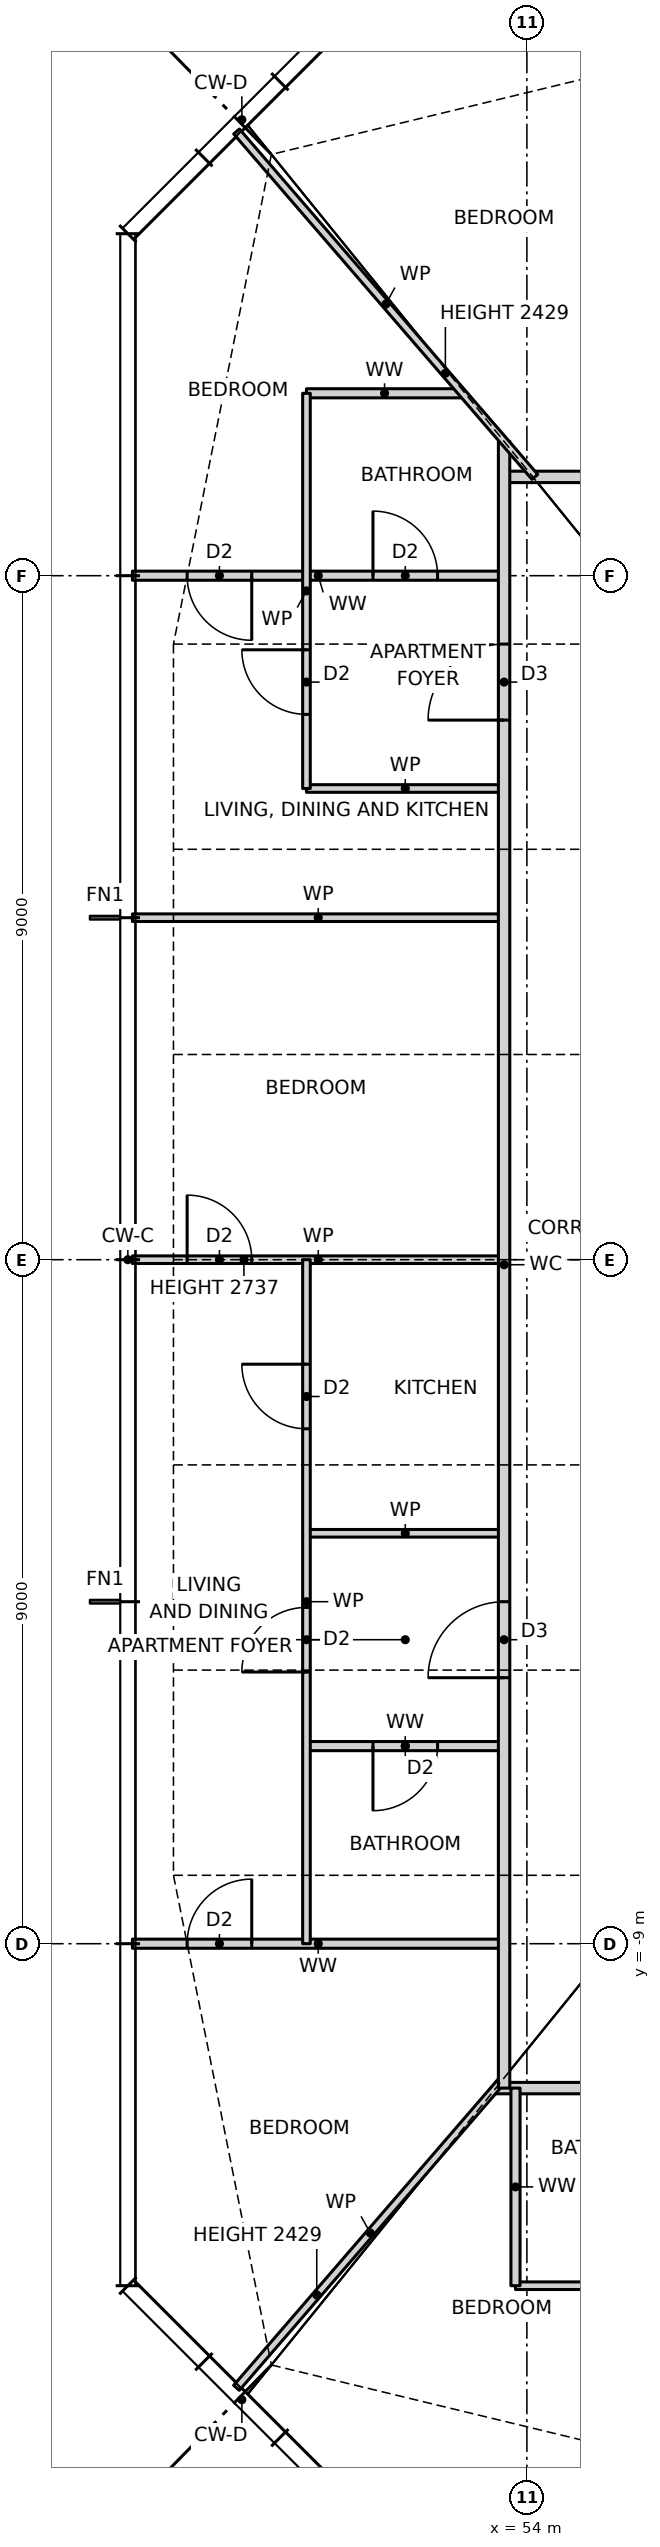
"""IFC4 building model, lengths in metres.
Left out: names, types, materials, properties, quantities, classifications, styles, units other than length and angle.
Written with IfcOpenShell. Run it as: python <this file> out.ifc"""

import sys

from ifc_helpers import new_model, si_unit, direction, frame, frame_2d, origin, place, context, subcontext, project, spatial, rectangle, extrude, element, fill, save


model = new_model("IFC4")
c1 = context("Model", 3, precision=1e-05, world=origin(), true_north=direction((0.0, 1.0)))
c2 = subcontext(c1, "Body", "Model", "MODEL_VIEW")
j1 = project(units=[si_unit("LENGTHUNIT", "METRE"), si_unit("PLANEANGLEUNIT", "RADIAN")], contexts=[c1])
p1 = place(None, origin())
s1 = spatial("IfcSite", under=j1, at=p1, CompositionType="ELEMENT")
p2 = place(p1, origin())
s2 = spatial("IfcBuilding", under=s1, at=p2, CompositionType="ELEMENT")
p3 = place(p2, frame((0.0, 0.0, 80.5)))
s3 = spatial("IfcBuildingStorey", under=s2, at=p3, CompositionType="ELEMENT", Elevation=80.5)
p4 = place(p3, frame((53.85, -13.5, 0.0), z_axis=(0.0, 0.0, 1.0), x_axis=(1.0, 0.0, 0.0)))
e1 = element("IfcWall", 1, at=p4, inside=s3, PredefinedType="PARTITIONING", context=c2, shape_type="SweptSolid", body=[
    extrude(rectangle(XDim=5.2, YDim=0.1, at=frame_2d((2.6, 0.0))), origin(), (0.0, 0.0, 1.0), 3.27),
])
p5 = place(p4, frame((3.375, 0.0, 0.0)))
e2 = element("IfcOpeningElement", 2, at=p5, cuts=e1, PredefinedType="OPENING", context=c2, shape_type="SweptSolid", body=[
    extrude(rectangle(XDim=0.85, YDim=2.1, at=frame_2d((0.425, 1.05))), frame((0.0, 0.06, 0.0), z_axis=(0.0, -1.0, 0.0), x_axis=(1.0, 0.0, 0.0)), (0.0, 0.0, 1.0), 0.12),
])
p6 = place(p3, frame((53.586, -10.9, 0.0), z_axis=(0.0, 0.0, 1.0), x_axis=(1.0, 0.0, 0.0)))
e3 = element("IfcWall", 3, at=p6, inside=s3, PredefinedType="PARTITIONING", context=c2, shape_type="SweptSolid", body=[
    extrude(rectangle(XDim=18.828, YDim=0.15, at=frame_2d((9.414, 0.0))), origin(), (0.0, 0.0, 1.0), 3.27),
])
p7 = place(p6, frame((3.564, 0.0, 0.0)))
e4 = element("IfcOpeningElement", 4, at=p7, cuts=e3, PredefinedType="OPENING", context=c2, shape_type="SweptSolid", body=[
    extrude(rectangle(XDim=1.0, YDim=2.1, at=frame_2d((0.5, 1.05))), frame((0.0, 0.085, 0.0), z_axis=(0.0, -1.0, 0.0), x_axis=(1.0, 0.0, 0.0)), (0.0, 0.0, 1.0), 0.17),
])
p8 = place(p6, frame((7.789, 0.0, 0.0)))
e5 = element("IfcOpeningElement", 5, at=p8, cuts=e3, PredefinedType="OPENING", context=c2, shape_type="SweptSolid", body=[
    extrude(rectangle(XDim=1.0, YDim=2.1, at=frame_2d((0.5, 1.05))), frame((0.0, 0.085, 0.0), z_axis=(0.0, -1.0, 0.0), x_axis=(1.0, 0.0, 0.0)), (0.0, 0.0, 1.0), 0.17),
])
p9 = place(p6, frame((12.564, 0.0, 0.0)))
e6 = element("IfcOpeningElement", 6, at=p9, cuts=e3, PredefinedType="OPENING", context=c2, shape_type="SweptSolid", body=[
    extrude(rectangle(XDim=1.0, YDim=2.1, at=frame_2d((0.5, 1.05))), frame((0.0, 0.085, 0.0), z_axis=(0.0, -1.0, 0.0), x_axis=(1.0, 0.0, 0.0)), (0.0, 0.0, 1.0), 0.17),
])
p10 = place(p3, frame((48.81, -9.0, 0.0), z_axis=(0.0, 0.0, 1.0), x_axis=(1.0, 0.0, 0.0)))
e7 = element("IfcWall", 7, at=p10, inside=s3, PredefinedType="PARTITIONING", context=c2, shape_type="SweptSolid", body=[
    extrude(rectangle(XDim=4.89, YDim=0.12, at=frame_2d((2.445, 0.0))), origin(), (0.0, 0.0, 1.0), 3.27),
])
p11 = place(p10, frame((0.72, 0.0, 0.0)))
e8 = element("IfcOpeningElement", 8, at=p11, cuts=e7, PredefinedType="OPENING", context=c2, shape_type="SweptSolid", body=[
    extrude(rectangle(XDim=0.85, YDim=2.1, at=frame_2d((0.425, 1.05))), frame((0.0, 0.07, 0.0), z_axis=(0.0, -1.0, 0.0), x_axis=(1.0, 0.0, 0.0)), (0.0, 0.0, 1.0), 0.14),
])
p12 = place(p3, frame((51.1, -6.4, 0.0), z_axis=(0.0, 0.0, 1.0), x_axis=(1.0, 0.0, 0.0)))
e9 = element("IfcWall", 9, at=p12, inside=s3, PredefinedType="PARTITIONING", context=c2, shape_type="SweptSolid", body=[
    extrude(rectangle(XDim=2.6, YDim=0.12, at=frame_2d((1.3, 0.0))), origin(), (0.0, 0.0, 1.0), 3.27),
])
p13 = place(p12, frame((0.875, 0.0, 0.0)))
e10 = element("IfcOpeningElement", 10, at=p13, cuts=e9, PredefinedType="OPENING", context=c2, shape_type="SweptSolid", body=[
    extrude(rectangle(XDim=0.85, YDim=2.1, at=frame_2d((0.425, 1.05))), frame((0.0, 0.07, 0.0), z_axis=(0.0, -1.0, 0.0), x_axis=(1.0, 0.0, 0.0)), (0.0, 0.0, 1.0), 0.14),
])
p14 = place(p3, frame((51.1, -3.6, 0.0), z_axis=(0.0, 0.0, 1.0), x_axis=(1.0, 0.0, 0.0)))
e11 = element("IfcWall", 11, at=p14, inside=s3, PredefinedType="PARTITIONING", context=c2, shape_type="SweptSolid", body=[
    extrude(rectangle(XDim=2.6, YDim=0.1, at=frame_2d((1.3, 0.0))), origin(), (0.0, 0.0, 1.0), 3.27),
])
p15 = place(p3, frame((48.81, 0.0, 0.0), z_axis=(0.0, 0.0, 1.0), x_axis=(1.0, 0.0, 0.0)))
e12 = element("IfcWall", 12, at=p15, inside=s3, PredefinedType="PARTITIONING", context=c2, shape_type="SweptSolid", body=[
    extrude(rectangle(XDim=4.89, YDim=0.1, at=frame_2d((2.445, 0.0))), origin(), (0.0, 0.0, 1.0), 2.737),
])
p16 = place(p15, frame((0.72, 0.0, 0.0)))
e13 = element("IfcOpeningElement", 13, at=p16, cuts=e12, PredefinedType="OPENING", context=c2, shape_type="SweptSolid", body=[
    extrude(rectangle(XDim=0.85, YDim=2.1, at=frame_2d((0.425, 1.05))), frame((0.0, 0.06, 0.0), z_axis=(0.0, -1.0, 0.0), x_axis=(1.0, 0.0, 0.0)), (0.0, 0.0, 1.0), 0.12),
])
p17 = place(p3, frame((48.81, 4.5, 0.0), z_axis=(0.0, 0.0, 1.0), x_axis=(1.0, 0.0, 0.0)))
e14 = element("IfcWall", 14, at=p17, inside=s3, PredefinedType="PARTITIONING", context=c2, shape_type="SweptSolid", body=[
    extrude(rectangle(XDim=4.89, YDim=0.1, at=frame_2d((2.445, 0.0))), origin(), (0.0, 0.0, 1.0), 3.27),
])
p18 = place(p3, frame((51.1, 6.2, 0.0), z_axis=(0.0, 0.0, 1.0), x_axis=(1.0, 0.0, 0.0)))
e15 = element("IfcWall", 15, at=p18, inside=s3, PredefinedType="PARTITIONING", context=c2, shape_type="SweptSolid", body=[
    extrude(rectangle(XDim=2.6, YDim=0.1, at=frame_2d((1.3, 0.0))), origin(), (0.0, 0.0, 1.0), 3.27),
])
p19 = place(p3, frame((48.81, 9.0, 0.0), z_axis=(0.0, 0.0, 1.0), x_axis=(1.0, 0.0, 0.0)))
e16 = element("IfcWall", 16, at=p19, inside=s3, PredefinedType="PARTITIONING", context=c2, shape_type="SweptSolid", body=[
    extrude(rectangle(XDim=4.89, YDim=0.12, at=frame_2d((2.445, 0.0))), origin(), (0.0, 0.0, 1.0), 3.27),
])
p20 = place(p19, frame((3.165, 0.0, 0.0)))
e17 = element("IfcOpeningElement", 17, at=p20, cuts=e16, PredefinedType="OPENING", context=c2, shape_type="SweptSolid", body=[
    extrude(rectangle(XDim=0.85, YDim=2.1, at=frame_2d((0.425, 1.05))), frame((0.0, 0.07, 0.0), z_axis=(0.0, -1.0, 0.0), x_axis=(1.0, 0.0, 0.0)), (0.0, 0.0, 1.0), 0.14),
])
p21 = place(p19, frame((0.72, 0.0, 0.0)))
e18 = element("IfcOpeningElement", 18, at=p21, cuts=e16, PredefinedType="OPENING", context=c2, shape_type="SweptSolid", body=[
    extrude(rectangle(XDim=0.85, YDim=2.1, at=frame_2d((0.425, 1.05))), frame((0.0, 0.07, 0.0), z_axis=(0.0, -1.0, 0.0), x_axis=(1.0, 0.0, 0.0)), (0.0, 0.0, 1.0), 0.14),
])
p22 = place(p3, frame((53.7, 10.3, 0.0), z_axis=(0.0, 0.0, 1.0), x_axis=(1.0, 0.0, 0.0)))
e19 = element("IfcWall", 19, at=p22, inside=s3, PredefinedType="PARTITIONING", context=c2, shape_type="SweptSolid", body=[
    extrude(rectangle(XDim=18.6, YDim=0.15, at=frame_2d((9.3, 0.0))), origin(), (0.0, 0.0, 1.0), 3.27),
])
p23 = place(p22, frame((8.8, 0.0, 0.0)))
e20 = element("IfcOpeningElement", 20, at=p23, cuts=e19, PredefinedType="OPENING", context=c2, shape_type="SweptSolid", body=[
    extrude(rectangle(XDim=1.0, YDim=2.1, at=frame_2d((0.5, 1.05))), frame((0.0, 0.085, 0.0), z_axis=(0.0, -1.0, 0.0), x_axis=(1.0, 0.0, 0.0)), (0.0, 0.0, 1.0), 0.17),
])
p24 = place(p3, frame((51.1, 11.4, 0.0), z_axis=(0.0, 0.0, 1.0), x_axis=(1.0, 0.0, 0.0)))
e21 = element("IfcWall", 21, at=p24, inside=s3, PredefinedType="PARTITIONING", context=c2, shape_type="SweptSolid", body=[
    extrude(rectangle(XDim=2.055, YDim=0.12, at=frame_2d((1.027, 0.0))), origin(), (0.0, 0.0, 1.0), 3.27),
])
p25 = place(p3, frame((50.179, -14.844, 0.0), z_axis=(0.0, 0.0, 1.0), x_axis=(0.653713095188, 0.756742485381, 0.0)))
e22 = element("IfcWall", 22, at=p25, inside=s3, PredefinedType="PARTITIONING", context=c2, shape_type="SweptSolid", body=[
    extrude(rectangle(XDim=5.386, YDim=0.1, at=frame_2d((2.693, 0.0))), origin(), (0.0, 0.0, 1.0), 2.429),
])
p26 = place(p3, frame((53.85, -13.5, 0.0), z_axis=(0.0, 0.0, 1.0), x_axis=(0.0, 1.0, 0.0)))
e23 = element("IfcWall", 23, at=p26, inside=s3, PredefinedType="PARTITIONING", context=c2, shape_type="SweptSolid", body=[
    extrude(rectangle(XDim=2.6, YDim=0.12, at=frame_2d((1.3, 0.0))), origin(), (0.0, 0.0, 1.0), 3.27),
])
p27 = place(p3, frame((53.7, -10.9, 0.0), z_axis=(0.0, 0.0, 1.0), x_axis=(0.0, 1.0, 0.0)))
e24 = element("IfcWall", 24, at=p27, inside=s3, PredefinedType="PARTITIONING", context=c2, shape_type="SweptSolid", body=[
    extrude(rectangle(XDim=21.668, YDim=0.15, at=frame_2d((10.834, 0.0))), origin(), (0.0, 0.0, 1.0), 3.27),
])
p28 = place(p27, frame((18.0, 0.0, 0.0)))
e25 = element("IfcOpeningElement", 25, at=p28, cuts=e24, PredefinedType="OPENING", context=c2, shape_type="SweptSolid", body=[
    extrude(rectangle(XDim=1.0, YDim=2.1, at=frame_2d((0.5, 1.05))), frame((0.0, 0.085, 0.0), z_axis=(0.0, -1.0, 0.0), x_axis=(1.0, 0.0, 0.0)), (0.0, 0.0, 1.0), 0.17),
])
p29 = place(p27, frame((5.4, 0.0, 0.0)))
e26 = element("IfcOpeningElement", 26, at=p29, cuts=e24, PredefinedType="OPENING", context=c2, shape_type="SweptSolid", body=[
    extrude(rectangle(XDim=1.0, YDim=2.1, at=frame_2d((0.5, 1.05))), frame((0.0, 0.085, 0.0), z_axis=(0.0, -1.0, 0.0), x_axis=(1.0, 0.0, 0.0)), (0.0, 0.0, 1.0), 0.17),
])
p30 = place(p3, frame((51.1, -9.0, 0.0), z_axis=(0.0, 0.0, 1.0), x_axis=(0.0, 1.0, 0.0)))
e27 = element("IfcWall", 27, at=p30, inside=s3, PredefinedType="PARTITIONING", context=c2, shape_type="SweptSolid", body=[
    extrude(rectangle(XDim=9.0, YDim=0.1, at=frame_2d((4.5, 0.0))), origin(), (0.0, 0.0, 1.0), 3.27),
])
p31 = place(p30, frame((6.775, 0.0, 0.0)))
e28 = element("IfcOpeningElement", 28, at=p31, cuts=e27, PredefinedType="OPENING", context=c2, shape_type="SweptSolid", body=[
    extrude(rectangle(XDim=0.85, YDim=2.1, at=frame_2d((0.425, 1.05))), frame((0.0, 0.06, 0.0), z_axis=(0.0, -1.0, 0.0), x_axis=(1.0, 0.0, 0.0)), (0.0, 0.0, 1.0), 0.12),
])
p32 = place(p30, frame((3.575, 0.0, 0.0)))
e29 = element("IfcOpeningElement", 29, at=p32, cuts=e27, PredefinedType="OPENING", context=c2, shape_type="SweptSolid", body=[
    extrude(rectangle(XDim=0.85, YDim=2.1, at=frame_2d((0.425, 1.05))), frame((0.0, 0.06, 0.0), z_axis=(0.0, -1.0, 0.0), x_axis=(1.0, 0.0, 0.0)), (0.0, 0.0, 1.0), 0.12),
])
p33 = place(p3, frame((51.1, 6.2, 0.0), z_axis=(0.0, 0.0, 1.0), x_axis=(0.0, 1.0, 0.0)))
e30 = element("IfcWall", 30, at=p33, inside=s3, PredefinedType="PARTITIONING", context=c2, shape_type="SweptSolid", body=[
    extrude(rectangle(XDim=5.2, YDim=0.1, at=frame_2d((2.6, 0.0))), origin(), (0.0, 0.0, 1.0), 3.27),
])
p34 = place(p33, frame((0.975, 0.0, 0.0)))
e31 = element("IfcOpeningElement", 31, at=p34, cuts=e30, PredefinedType="OPENING", context=c2, shape_type="SweptSolid", body=[
    extrude(rectangle(XDim=0.85, YDim=2.1, at=frame_2d((0.425, 1.05))), frame((0.0, 0.06, 0.0), z_axis=(0.0, -1.0, 0.0), x_axis=(1.0, 0.0, 0.0)), (0.0, 0.0, 1.0), 0.12),
])
p35 = place(p3, frame((54.105, 10.3, 0.0), z_axis=(0.0, 0.0, 1.0), x_axis=(-0.653606109319, 0.756834892074, 0.0)))
e32 = element("IfcWall", 32, at=p35, inside=s3, PredefinedType="PARTITIONING", context=c2, shape_type="SweptSolid", body=[
    extrude(rectangle(XDim=6.005, YDim=0.1, at=frame_2d((3.002, 0.0))), origin(), (0.0, 0.0, 1.0), 2.429),
])
p36 = place(p28, origin())
e33 = element("IfcDoor", 33, at=p36, inside=s3, OperationType="SINGLE_SWING_LEFT", PredefinedType="DOOR", context=c2, shape_type="SweptSolid", body=[
    extrude(rectangle(XDim=1.0, YDim=2.1, at=frame_2d((0.5, 1.05))), frame((0.0, 0.025, 0.0), z_axis=(0.0, -1.0, 0.0), x_axis=(1.0, 0.0, 0.0)), (0.0, 0.0, 1.0), 0.05),
])
fill(e25, e33)
p37 = place(p34, origin())
e34 = element("IfcDoor", 34, at=p37, inside=s3, OperationType="SINGLE_SWING_RIGHT", PredefinedType="DOOR", context=c2, shape_type="SweptSolid", body=[
    extrude(rectangle(XDim=0.85, YDim=2.1, at=frame_2d((0.425, 1.05))), frame((0.0, 0.025, 0.0), z_axis=(0.0, -1.0, 0.0), x_axis=(1.0, 0.0, 0.0)), (0.0, 0.0, 1.0), 0.05),
])
fill(e31, e34)
p38 = place(p20, origin())
e35 = element("IfcDoor", 35, at=p38, inside=s3, OperationType="SINGLE_SWING_LEFT", PredefinedType="DOOR", context=c2, shape_type="SweptSolid", body=[
    extrude(rectangle(XDim=0.85, YDim=2.1, at=frame_2d((0.425, 1.05))), frame((0.0, 0.025, 0.0), z_axis=(0.0, -1.0, 0.0), x_axis=(1.0, 0.0, 0.0)), (0.0, 0.0, 1.0), 0.05),
])
fill(e17, e35)
p39 = place(p21, frame((0.85, 0.0, 0.0), z_axis=(0.0, 0.0, 1.0), x_axis=(-1.0, 0.0, 0.0)))
e36 = element("IfcDoor", 36, at=p39, inside=s3, OperationType="SINGLE_SWING_LEFT", PredefinedType="DOOR", context=c2, shape_type="SweptSolid", body=[
    extrude(rectangle(XDim=0.85, YDim=2.1, at=frame_2d((0.425, 1.05))), frame((0.0, 0.025, 0.0), z_axis=(0.0, -1.0, 0.0), x_axis=(1.0, 0.0, 0.0)), (0.0, 0.0, 1.0), 0.05),
])
fill(e18, e36)
p40 = place(p31, origin())
e37 = element("IfcDoor", 37, at=p40, inside=s3, OperationType="SINGLE_SWING_RIGHT", PredefinedType="DOOR", context=c2, shape_type="SweptSolid", body=[
    extrude(rectangle(XDim=0.85, YDim=2.1, at=frame_2d((0.425, 1.05))), frame((0.0, 0.025, 0.0), z_axis=(0.0, -1.0, 0.0), x_axis=(1.0, 0.0, 0.0)), (0.0, 0.0, 1.0), 0.05),
])
fill(e28, e37)
p41 = place(p29, origin())
e38 = element("IfcDoor", 38, at=p41, inside=s3, OperationType="SINGLE_SWING_LEFT", PredefinedType="DOOR", context=c2, shape_type="SweptSolid", body=[
    extrude(rectangle(XDim=1.0, YDim=2.1, at=frame_2d((0.5, 1.05))), frame((0.0, 0.025, 0.0), z_axis=(0.0, -1.0, 0.0), x_axis=(1.0, 0.0, 0.0)), (0.0, 0.0, 1.0), 0.05),
])
fill(e26, e38)
p42 = place(p32, origin())
e39 = element("IfcDoor", 39, at=p42, inside=s3, OperationType="SINGLE_SWING_LEFT", PredefinedType="DOOR", context=c2, shape_type="SweptSolid", body=[
    extrude(rectangle(XDim=0.85, YDim=2.1, at=frame_2d((0.425, 1.05))), frame((0.0, 0.025, 0.0), z_axis=(0.0, -1.0, 0.0), x_axis=(1.0, 0.0, 0.0)), (0.0, 0.0, 1.0), 0.05),
])
fill(e29, e39)
p43 = place(p13, frame((0.85, 0.0, 0.0), z_axis=(0.0, 0.0, 1.0), x_axis=(-1.0, 0.0, 0.0)))
e40 = element("IfcDoor", 40, at=p43, inside=s3, OperationType="SINGLE_SWING_RIGHT", PredefinedType="DOOR", context=c2, shape_type="SweptSolid", body=[
    extrude(rectangle(XDim=0.85, YDim=2.1, at=frame_2d((0.425, 1.05))), frame((0.0, 0.025, 0.0), z_axis=(0.0, -1.0, 0.0), x_axis=(1.0, 0.0, 0.0)), (0.0, 0.0, 1.0), 0.05),
])
fill(e10, e40)
p44 = place(p16, origin())
e41 = element("IfcDoor", 41, at=p44, inside=s3, OperationType="SINGLE_SWING_LEFT", PredefinedType="DOOR", context=c2, shape_type="SweptSolid", body=[
    extrude(rectangle(XDim=0.85, YDim=2.1, at=frame_2d((0.425, 1.05))), frame((0.0, 0.025, 0.0), z_axis=(0.0, -1.0, 0.0), x_axis=(1.0, 0.0, 0.0)), (0.0, 0.0, 1.0), 0.05),
])
fill(e13, e41)
p45 = place(p11, origin())
e42 = element("IfcDoor", 42, at=p45, inside=s3, OperationType="SINGLE_SWING_RIGHT", PredefinedType="DOOR", context=c2, shape_type="SweptSolid", body=[
    extrude(rectangle(XDim=0.85, YDim=2.1, at=frame_2d((0.425, 1.05))), frame((0.0, 0.025, 0.0), z_axis=(0.0, -1.0, 0.0), x_axis=(1.0, 0.0, 0.0)), (0.0, 0.0, 1.0), 0.05),
])
fill(e8, e42)
save(model, sys.argv[1])
